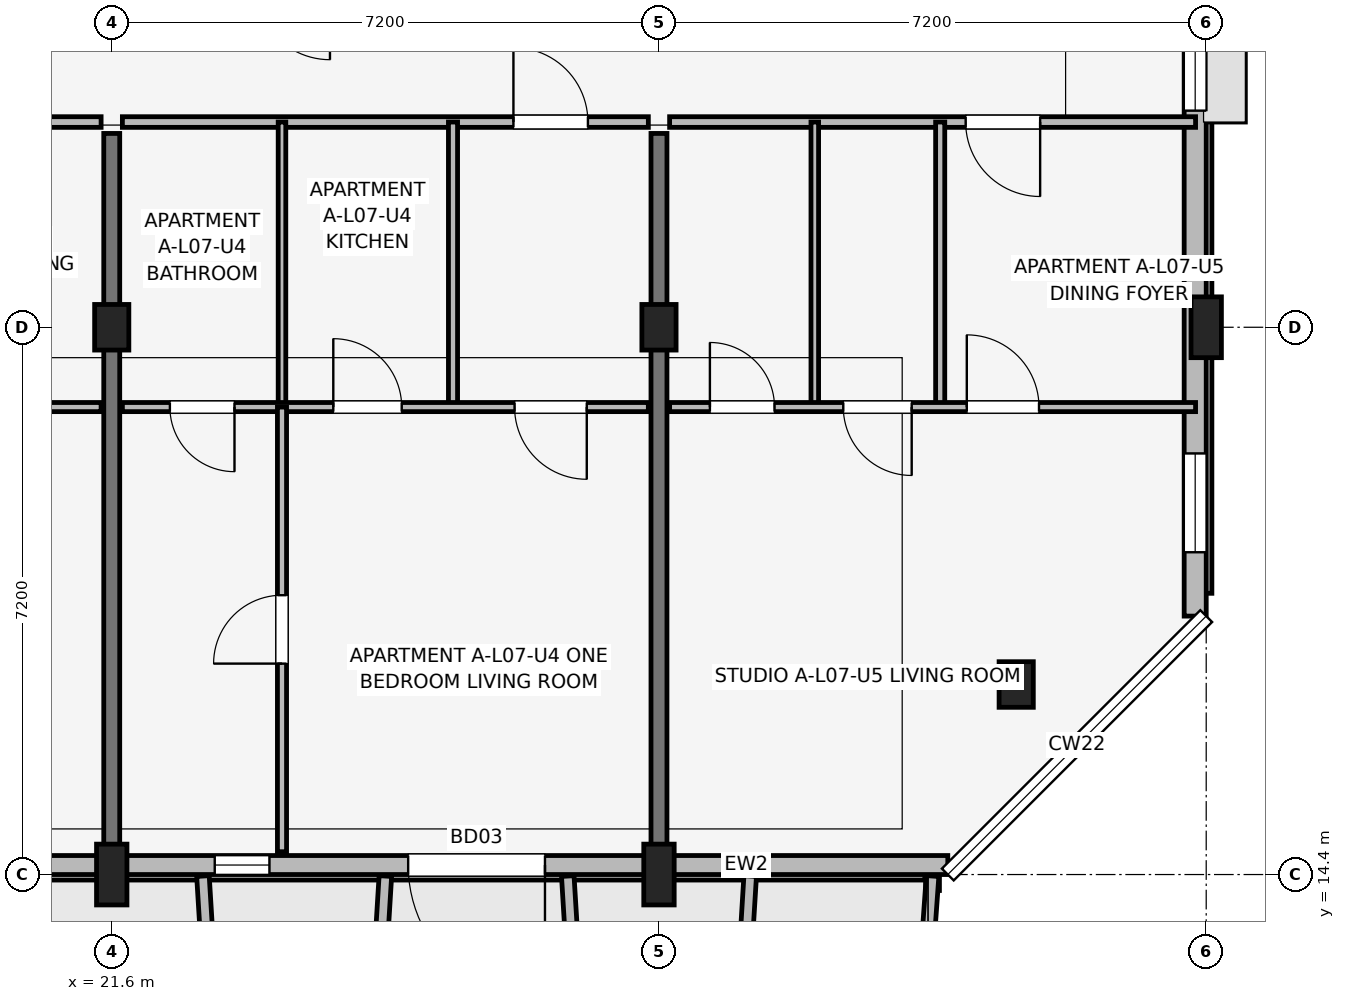
"""IFC4 building model, lengths in metres.
Left out: names, types, materials, properties, quantities, classifications, styles, units other than length and angle.
Written with IfcOpenShell. Run it as: python <this file> out.ifc"""

import sys

from ifc_helpers import new_model, si_unit, direction, frame, frame_2d, origin, origin_2d, place, context, subcontext, project, spatial, rectangle, extrude, element, fill, save


model = new_model("IFC4")
c1 = context("Model", 3, precision=1e-05, world=origin(), true_north=direction((0.0, 1.0)))
c2 = subcontext(c1, "Body", "Model", "MODEL_VIEW")
j1 = project(units=[si_unit("LENGTHUNIT", "METRE"), si_unit("PLANEANGLEUNIT", "RADIAN")], contexts=[c1])
p1 = place(None, origin())
s1 = spatial("IfcSite", under=j1, at=p1, CompositionType="ELEMENT")
p2 = place(p1, origin())
s2 = spatial("IfcBuilding", under=s1, at=p2, CompositionType="ELEMENT")
p3 = place(p2, frame((0.0, 0.0, 24.45)))
s3 = spatial("IfcBuildingStorey", under=s2, at=p3, CompositionType="ELEMENT", Elevation=24.45)
p4 = place(p3, frame((21.6, 14.4, 0.0), z_axis=(0.0, 0.0, 1.0), x_axis=(1.0, 0.0, 0.0)))
e1 = element("IfcColumn", 1, at=p4, inside=s3, PredefinedType="COLUMN", context=c2, shape_type="SweptSolid", body=[
    extrude(rectangle(XDim=0.4, YDim=0.8, at=origin_2d()), origin(), (0.0, 0.0, 1.0), 3.15),
])
p5 = place(p3, frame((21.6, 21.6, 0.0), z_axis=(0.0, 0.0, 1.0), x_axis=(1.0, 0.0, 0.0)))
e2 = element("IfcColumn", 2, at=p5, inside=s3, PredefinedType="COLUMN", context=c2, shape_type="SweptSolid", body=[
    extrude(rectangle(XDim=0.45, YDim=0.6, at=origin_2d()), origin(), (0.0, 0.0, 1.0), 3.15),
])
p6 = place(p3, frame((28.8, 14.4, 0.0), z_axis=(0.0, 0.0, 1.0), x_axis=(1.0, 0.0, 0.0)))
e3 = element("IfcColumn", 3, at=p6, inside=s3, PredefinedType="COLUMN", context=c2, shape_type="SweptSolid", body=[
    extrude(rectangle(XDim=0.4, YDim=0.8, at=origin_2d()), origin(), (0.0, 0.0, 1.0), 3.15),
])
for number, where, z_axis, x_axis in (
    (4, (28.8, 21.6, 0.0), (0.0, 0.0, 1.0), (1.0, 0.0, 0.0)),
    (5, (33.5, 16.9, 0.0), (0.0, 0.0, 1.0), (1.0, 0.0, 0.0)),
):
    element("IfcColumn", number, at=place(p3, frame(where, z_axis=z_axis, x_axis=x_axis)), inside=s3, PredefinedType="COLUMN", context=c2, shape_type="SweptSolid", body=[
        extrude(rectangle(XDim=0.45, YDim=0.6, at=origin_2d()), origin(), (0.0, 0.0, 1.0), 3.15),
    ])
p7 = place(p3, frame((36.0, 21.6, 0.0), z_axis=(0.0, 0.0, 1.0), x_axis=(1.0, 0.0, 0.0)))
e6 = element("IfcColumn", 6, at=p7, inside=s3, PredefinedType="COLUMN", context=c2, shape_type="SweptSolid", body=[
    extrude(rectangle(XDim=0.4, YDim=0.8, at=origin_2d()), origin(), (0.0, 0.0, 1.0), 3.15),
])
for number, where, z_axis, x_axis in (
    (7, (21.6, 14.75, 0.0), (0.0, 0.0, 1.0), (0.0, 1.0, 0.0)),
    (8, (28.8, 14.75, 0.0), (0.0, 0.0, 1.0), (0.0, 1.0, 0.0)),
):
    element("IfcWall", number, at=place(p3, frame(where, z_axis=z_axis, x_axis=x_axis)), inside=s3, PredefinedType="SHEAR", context=c2, shape_type="SweptSolid", body=[
        extrude(rectangle(XDim=9.4, YDim=0.21, at=frame_2d((4.7, 0.0))), origin(), (0.0, 0.0, 1.0), 3.15),
    ])
p8 = place(p3, frame((3.4, 14.525, 0.0), z_axis=(0.0, 0.0, 1.0), x_axis=(1.0, 0.0, 0.0)))
e9 = element("IfcWall", 9, at=p8, inside=s3, PredefinedType="SOLIDWALL", context=c2, shape_type="SweptSolid", body=[
    extrude(rectangle(XDim=29.2, YDim=0.25, at=frame_2d((14.6, 0.0))), origin(), (0.0, 0.0, 1.0), 2.43),
])
p9 = place(p8, frame((9.35, 0.0, 0.0), z_axis=(0.0, 0.0, 1.0), x_axis=(-1.0, 0.0, 0.0)))
e10 = element("IfcOpeningElement", 10, at=p9, cuts=e9, PredefinedType="OPENING", context=c2, shape_type="SweptSolid", body=[
    extrude(rectangle(XDim=1.5, YDim=2.15, at=frame_2d((0.75, 1.075))), frame((0.0, 0.135, 0.0), z_axis=(0.0, -1.0, 0.0), x_axis=(1.0, 0.0, 0.0)), (0.0, 0.0, 1.0), 0.27),
])
p10 = place(p8, frame((23.9, 0.0, 0.0), z_axis=(0.0, 0.0, 1.0), x_axis=(-1.0, 0.0, 0.0)))
e11 = element("IfcOpeningElement", 11, at=p10, cuts=e9, PredefinedType="OPENING", context=c2, shape_type="SweptSolid", body=[
    extrude(rectangle(XDim=1.8, YDim=2.15, at=frame_2d((0.9, 1.075))), frame((0.0, 0.135, 0.0), z_axis=(0.0, -1.0, 0.0), x_axis=(1.0, 0.0, 0.0)), (0.0, 0.0, 1.0), 0.27),
])
p11 = place(p8, frame((1.125, 0.0, 0.75)))
e12 = element("IfcOpeningElement", 12, at=p11, cuts=e9, PredefinedType="OPENING", context=c2, shape_type="SweptSolid", body=[
    extrude(rectangle(XDim=0.72, YDim=1.35, at=frame_2d((0.36, 0.675))), frame((0.0, 0.135, 0.0), z_axis=(0.0, -1.0, 0.0), x_axis=(1.0, 0.0, 0.0)), (0.0, 0.0, 1.0), 0.27),
])
p12 = place(p8, frame((5.155, 0.0, 0.75)))
e13 = element("IfcOpeningElement", 13, at=p12, cuts=e9, PredefinedType="OPENING", context=c2, shape_type="SweptSolid", body=[
    extrude(rectangle(XDim=0.72, YDim=1.35, at=frame_2d((0.36, 0.675))), frame((0.0, 0.135, 0.0), z_axis=(0.0, -1.0, 0.0), x_axis=(1.0, 0.0, 0.0)), (0.0, 0.0, 1.0), 0.27),
])
p13 = place(p8, frame((12.325, 0.0, 0.67)))
e14 = element("IfcOpeningElement", 14, at=p13, cuts=e9, PredefinedType="OPENING", context=c2, shape_type="SweptSolid", body=[
    extrude(rectangle(XDim=2.15, YDim=1.65, at=frame_2d((1.075, 0.825))), frame((0.0, 0.135, 0.0), z_axis=(0.0, -1.0, 0.0), x_axis=(1.0, 0.0, 0.0)), (0.0, 0.0, 1.0), 0.27),
])
p14 = place(p8, frame((19.555, 0.0, 0.75)))
e15 = element("IfcOpeningElement", 15, at=p14, cuts=e9, PredefinedType="OPENING", context=c2, shape_type="SweptSolid", body=[
    extrude(rectangle(XDim=0.72, YDim=1.35, at=frame_2d((0.36, 0.675))), frame((0.0, 0.135, 0.0), z_axis=(0.0, -1.0, 0.0), x_axis=(1.0, 0.0, 0.0)), (0.0, 0.0, 1.0), 0.27),
])
p15 = place(p3, frame((35.855, 17.8, 0.0), z_axis=(0.0, 0.0, 1.0), x_axis=(0.0, 1.0, 0.0)))
e16 = element("IfcWall", 16, at=p15, inside=s3, PredefinedType="SOLIDWALL", context=c2, shape_type="SweptSolid", body=[
    extrude(rectangle(XDim=14.8, YDim=0.29, at=frame_2d((7.4, 0.0))), origin(), (0.0, 0.0, 1.0), 2.43),
])
p16 = place(p15, frame((6.65, 0.0, 1.05)))
e17 = element("IfcOpeningElement", 17, at=p16, cuts=e16, PredefinedType="OPENING", context=c2, shape_type="SweptSolid", body=[
    extrude(rectangle(XDim=1.5, YDim=1.15, at=frame_2d((0.75, 0.575))), frame((0.0, 0.155, 0.0), z_axis=(0.0, -1.0, 0.0), x_axis=(1.0, 0.0, 0.0)), (0.0, 0.0, 1.0), 0.31),
])
p17 = place(p15, frame((0.84, 0.0, 0.75)))
e18 = element("IfcOpeningElement", 18, at=p17, cuts=e16, PredefinedType="OPENING", context=c2, shape_type="SweptSolid", body=[
    extrude(rectangle(XDim=1.3, YDim=1.55, at=frame_2d((0.65, 0.775))), frame((0.0, 0.155, 0.0), z_axis=(0.0, -1.0, 0.0), x_axis=(1.0, 0.0, 0.0)), (0.0, 0.0, 1.0), 0.31),
])
for number, where, z_axis, x_axis in (
    (19, (22.8, 14.38, 0.0), (0.0, 0.0, 1.0), (0.061, -0.998, 0.0)),
    (20, (25.2, 14.38, 0.0), (0.0, 0.0, 1.0), (-0.061, -0.998, 0.0)),
    (21, (27.6, 14.38, 0.0), (0.0, 0.0, 1.0), (0.061, -0.998, 0.0)),
):
    element("IfcWall", number, at=place(p3, frame(where, z_axis=z_axis, x_axis=x_axis)), inside=s3, PredefinedType="ELEMENTEDWALL", context=c2, shape_type="SweptSolid", body=[
        extrude(rectangle(XDim=1.964, YDim=0.165, at=frame_2d((0.982, 0.0))), origin(), (0.0, 0.0, 1.0), 2.58),
    ])
p18 = place(p3, frame((30.0, 14.38, 0.0), z_axis=(0.0, 0.0, 1.0), x_axis=(-0.061170732449, -0.998127317276, 0.0)))
e22 = element("IfcWall", 22, at=p18, inside=s3, PredefinedType="ELEMENTEDWALL", context=c2, shape_type="SweptSolid", body=[
    extrude(rectangle(XDim=1.964, YDim=0.165, at=frame_2d((0.982, 0.0))), origin(), (0.0, 0.0, 1.0), 2.8),
])
p19 = place(p3, frame((32.4, 14.38, 0.0), z_axis=(0.0, 0.0, 1.0), x_axis=(-0.071194071069, -0.997462482625, 0.0)))
e23 = element("IfcWall", 23, at=p19, inside=s3, PredefinedType="ELEMENTEDWALL", context=c2, shape_type="SweptSolid", body=[
    extrude(rectangle(XDim=1.965, YDim=0.165, at=frame_2d((0.982, 0.0))), origin(), (0.0, 0.0, 1.0), 2.8),
])
p20 = place(p3, frame((14.54, 24.3, 0.0), z_axis=(0.0, 0.0, 1.0), x_axis=(1.0, 0.0, 0.0)))
e24 = element("IfcWall", 24, at=p20, inside=s3, PredefinedType="PARTITIONING", context=c2, shape_type="SweptSolid", body=[
    extrude(rectangle(XDim=6.92, YDim=0.14, at=frame_2d((3.46, 0.0))), origin(), (0.0, 0.0, 1.0), 2.38),
])
p21 = place(p20, frame((4.995, 0.0, 0.0)))
e25 = element("IfcOpeningElement", 25, at=p21, cuts=e24, PredefinedType="OPENING", context=c2, shape_type="SweptSolid", body=[
    extrude(rectangle(XDim=0.98, YDim=2.1, at=frame_2d((0.49, 1.05))), frame((0.0, 0.08, 0.0), z_axis=(0.0, -1.0, 0.0), x_axis=(1.0, 0.0, 0.0)), (0.0, 0.0, 1.0), 0.16),
])
p22 = place(p3, frame((14.54, 20.55, 0.0), z_axis=(0.0, 0.0, 1.0), x_axis=(1.0, 0.0, 0.0)))
e26 = element("IfcWall", 26, at=p22, inside=s3, PredefinedType="PARTITIONING", context=c2, shape_type="SweptSolid", body=[
    extrude(rectangle(XDim=6.92, YDim=0.12, at=frame_2d((3.46, 0.0))), origin(), (0.0, 0.0, 1.0), 2.38),
])
p23 = place(p22, frame((1.475, 0.0, 0.0), z_axis=(0.0, 0.0, 1.0), x_axis=(-1.0, 0.0, 0.0)))
e27 = element("IfcOpeningElement", 27, at=p23, cuts=e26, PredefinedType="OPENING", context=c2, shape_type="SweptSolid", body=[
    extrude(rectangle(XDim=0.85, YDim=2.08, at=frame_2d((0.425, 1.04))), frame((0.0, 0.07, 0.0), z_axis=(0.0, -1.0, 0.0), x_axis=(1.0, 0.0, 0.0)), (0.0, 0.0, 1.0), 0.14),
])
p24 = place(p22, frame((2.625, 0.0, 0.0)))
e28 = element("IfcOpeningElement", 28, at=p24, cuts=e26, PredefinedType="OPENING", context=c2, shape_type="SweptSolid", body=[
    extrude(rectangle(XDim=0.9, YDim=2.08, at=frame_2d((0.45, 1.04))), frame((0.0, 0.07, 0.0), z_axis=(0.0, -1.0, 0.0), x_axis=(1.0, 0.0, 0.0)), (0.0, 0.0, 1.0), 0.14),
])
p25 = place(p22, frame((5.96, 0.0, 0.0), z_axis=(0.0, 0.0, 1.0), x_axis=(-1.0, 0.0, 0.0)))
e29 = element("IfcOpeningElement", 29, at=p25, cuts=e26, PredefinedType="OPENING", context=c2, shape_type="SweptSolid", body=[
    extrude(rectangle(XDim=0.95, YDim=2.08, at=frame_2d((0.475, 1.04))), frame((0.0, 0.07, 0.0), z_axis=(0.0, -1.0, 0.0), x_axis=(1.0, 0.0, 0.0)), (0.0, 0.0, 1.0), 0.14),
])
p26 = place(p3, frame((21.74, 24.3, 0.0), z_axis=(0.0, 0.0, 1.0), x_axis=(1.0, 0.0, 0.0)))
e30 = element("IfcWall", 30, at=p26, inside=s3, PredefinedType="PARTITIONING", context=c2, shape_type="SweptSolid", body=[
    extrude(rectangle(XDim=6.92, YDim=0.14, at=frame_2d((3.46, 0.0))), origin(), (0.0, 0.0, 1.0), 2.38),
])
p27 = place(p26, frame((5.145, 0.0, 0.0)))
e31 = element("IfcOpeningElement", 31, at=p27, cuts=e30, PredefinedType="OPENING", context=c2, shape_type="SweptSolid", body=[
    extrude(rectangle(XDim=0.98, YDim=2.1, at=frame_2d((0.49, 1.05))), frame((0.0, 0.08, 0.0), z_axis=(0.0, -1.0, 0.0), x_axis=(1.0, 0.0, 0.0)), (0.0, 0.0, 1.0), 0.16),
])
p28 = place(p3, frame((23.84, 20.55, 0.0), z_axis=(0.0, 0.0, 1.0), x_axis=(0.0, 1.0, 0.0)))
e32 = element("IfcWall", 32, at=p28, inside=s3, PredefinedType="PARTITIONING", context=c2, shape_type="SweptSolid", body=[
    extrude(rectangle(XDim=3.75, YDim=0.1, at=frame_2d((1.875, 0.0))), origin(), (0.0, 0.0, 1.0), 2.38),
])
p29 = place(p3, frame((26.09, 20.55, 0.0), z_axis=(0.0, 0.0, 1.0), x_axis=(0.0, 1.0, 0.0)))
e33 = element("IfcWall", 33, at=p29, inside=s3, PredefinedType="PARTITIONING", context=c2, shape_type="SweptSolid", body=[
    extrude(rectangle(XDim=3.75, YDim=0.12, at=frame_2d((1.875, 0.0))), origin(), (0.0, 0.0, 1.0), 2.38),
])
p30 = place(p3, frame((21.74, 20.55, 0.0), z_axis=(0.0, 0.0, 1.0), x_axis=(1.0, 0.0, 0.0)))
e34 = element("IfcWall", 34, at=p30, inside=s3, PredefinedType="PARTITIONING", context=c2, shape_type="SweptSolid", body=[
    extrude(rectangle(XDim=6.92, YDim=0.12, at=frame_2d((3.46, 0.0))), origin(), (0.0, 0.0, 1.0), 2.38),
])
p31 = place(p30, frame((1.475, 0.0, 0.0), z_axis=(0.0, 0.0, 1.0), x_axis=(-1.0, 0.0, 0.0)))
e35 = element("IfcOpeningElement", 35, at=p31, cuts=e34, PredefinedType="OPENING", context=c2, shape_type="SweptSolid", body=[
    extrude(rectangle(XDim=0.85, YDim=2.08, at=frame_2d((0.425, 1.04))), frame((0.0, 0.07, 0.0), z_axis=(0.0, -1.0, 0.0), x_axis=(1.0, 0.0, 0.0)), (0.0, 0.0, 1.0), 0.14),
])
p32 = place(p30, frame((2.775, 0.0, 0.0)))
e36 = element("IfcOpeningElement", 36, at=p32, cuts=e34, PredefinedType="OPENING", context=c2, shape_type="SweptSolid", body=[
    extrude(rectangle(XDim=0.9, YDim=2.08, at=frame_2d((0.45, 1.04))), frame((0.0, 0.07, 0.0), z_axis=(0.0, -1.0, 0.0), x_axis=(1.0, 0.0, 0.0)), (0.0, 0.0, 1.0), 0.14),
])
p33 = place(p30, frame((6.11, 0.0, 0.0), z_axis=(0.0, 0.0, 1.0), x_axis=(-1.0, 0.0, 0.0)))
e37 = element("IfcOpeningElement", 37, at=p33, cuts=e34, PredefinedType="OPENING", context=c2, shape_type="SweptSolid", body=[
    extrude(rectangle(XDim=0.95, YDim=2.08, at=frame_2d((0.475, 1.04))), frame((0.0, 0.07, 0.0), z_axis=(0.0, -1.0, 0.0), x_axis=(1.0, 0.0, 0.0)), (0.0, 0.0, 1.0), 0.14),
])
p34 = place(p3, frame((23.84, 14.7, 0.0), z_axis=(0.0, 0.0, 1.0), x_axis=(0.0, 1.0, 0.0)))
e38 = element("IfcWall", 38, at=p34, inside=s3, PredefinedType="PARTITIONING", context=c2, shape_type="SweptSolid", body=[
    extrude(rectangle(XDim=5.85, YDim=0.12, at=frame_2d((2.925, 0.0))), origin(), (0.0, 0.0, 1.0), 2.38),
])
p35 = place(p34, frame((2.475, 0.0, 0.0)))
e39 = element("IfcOpeningElement", 39, at=p35, cuts=e38, PredefinedType="OPENING", context=c2, shape_type="SweptSolid", body=[
    extrude(rectangle(XDim=0.9, YDim=2.08, at=frame_2d((0.45, 1.04))), frame((0.0, 0.07, 0.0), z_axis=(0.0, -1.0, 0.0), x_axis=(1.0, 0.0, 0.0)), (0.0, 0.0, 1.0), 0.14),
])
p36 = place(p3, frame((28.94, 24.3, 0.0), z_axis=(0.0, 0.0, 1.0), x_axis=(1.0, 0.0, 0.0)))
e40 = element("IfcWall", 40, at=p36, inside=s3, PredefinedType="PARTITIONING", context=c2, shape_type="SweptSolid", body=[
    extrude(rectangle(XDim=6.92, YDim=0.14, at=frame_2d((3.46, 0.0))), origin(), (0.0, 0.0, 1.0), 2.38),
])
p37 = place(p36, frame((4.875, 0.0, 0.0), z_axis=(0.0, 0.0, 1.0), x_axis=(-1.0, 0.0, 0.0)))
e41 = element("IfcOpeningElement", 41, at=p37, cuts=e40, PredefinedType="OPENING", context=c2, shape_type="SweptSolid", body=[
    extrude(rectangle(XDim=0.98, YDim=2.1, at=frame_2d((0.49, 1.05))), frame((0.0, 0.08, 0.0), z_axis=(0.0, -1.0, 0.0), x_axis=(1.0, 0.0, 0.0)), (0.0, 0.0, 1.0), 0.16),
])
p38 = place(p3, frame((30.85, 20.55, 0.0), z_axis=(0.0, 0.0, 1.0), x_axis=(0.0, 1.0, 0.0)))
e42 = element("IfcWall", 42, at=p38, inside=s3, PredefinedType="PARTITIONING", context=c2, shape_type="SweptSolid", body=[
    extrude(rectangle(XDim=3.75, YDim=0.1, at=frame_2d((1.875, 0.0))), origin(), (0.0, 0.0, 1.0), 2.38),
])
p39 = place(p3, frame((32.5, 20.55, 0.0), z_axis=(0.0, 0.0, 1.0), x_axis=(0.0, 1.0, 0.0)))
e43 = element("IfcWall", 43, at=p39, inside=s3, PredefinedType="PARTITIONING", context=c2, shape_type="SweptSolid", body=[
    extrude(rectangle(XDim=3.75, YDim=0.12, at=frame_2d((1.875, 0.0))), origin(), (0.0, 0.0, 1.0), 2.38),
])
p40 = place(p3, frame((28.94, 20.55, 0.0), z_axis=(0.0, 0.0, 1.0), x_axis=(1.0, 0.0, 0.0)))
e44 = element("IfcWall", 44, at=p40, inside=s3, PredefinedType="PARTITIONING", context=c2, shape_type="SweptSolid", body=[
    extrude(rectangle(XDim=6.92, YDim=0.12, at=frame_2d((3.46, 0.0))), origin(), (0.0, 0.0, 1.0), 2.38),
])
p41 = place(p40, frame((0.53, 0.0, 0.0)))
e45 = element("IfcOpeningElement", 45, at=p41, cuts=e44, PredefinedType="OPENING", context=c2, shape_type="SweptSolid", body=[
    extrude(rectangle(XDim=0.85, YDim=2.08, at=frame_2d((0.425, 1.04))), frame((0.0, 0.07, 0.0), z_axis=(0.0, -1.0, 0.0), x_axis=(1.0, 0.0, 0.0)), (0.0, 0.0, 1.0), 0.14),
])
p42 = place(p40, frame((3.185, 0.0, 0.0), z_axis=(0.0, 0.0, 1.0), x_axis=(-1.0, 0.0, 0.0)))
e46 = element("IfcOpeningElement", 46, at=p42, cuts=e44, PredefinedType="OPENING", context=c2, shape_type="SweptSolid", body=[
    extrude(rectangle(XDim=0.9, YDim=2.08, at=frame_2d((0.45, 1.04))), frame((0.0, 0.07, 0.0), z_axis=(0.0, -1.0, 0.0), x_axis=(1.0, 0.0, 0.0)), (0.0, 0.0, 1.0), 0.14),
])
p43 = place(p40, frame((3.91, 0.0, 0.0)))
e47 = element("IfcOpeningElement", 47, at=p43, cuts=e44, PredefinedType="OPENING", context=c2, shape_type="SweptSolid", body=[
    extrude(rectangle(XDim=0.95, YDim=2.08, at=frame_2d((0.475, 1.04))), frame((0.0, 0.07, 0.0), z_axis=(0.0, -1.0, 0.0), x_axis=(1.0, 0.0, 0.0)), (0.0, 0.0, 1.0), 0.14),
])
p44 = place(p10, origin())
e48 = element("IfcDoor", 48, at=p44, inside=s3, OperationType="SINGLE_SWING_RIGHT", PredefinedType="DOOR", context=c2, shape_type="SweptSolid", body=[
    extrude(rectangle(XDim=1.8, YDim=2.15, at=frame_2d((0.9, 1.075))), frame((0.0, 0.025, 0.0), z_axis=(0.0, -1.0, 0.0), x_axis=(1.0, 0.0, 0.0)), (0.0, 0.0, 1.0), 0.05),
])
fill(e11, e48)
p45 = place(p14, origin())
e49 = element("IfcWindow", 49, at=p45, inside=s3, PartitioningType="SINGLE_PANEL", PredefinedType="WINDOW", context=c2, shape_type="SweptSolid", body=[
    extrude(rectangle(XDim=0.72, YDim=1.35, at=frame_2d((0.36, 0.675))), frame((0.0, 0.03, 0.0), z_axis=(0.0, -1.0, 0.0), x_axis=(1.0, 0.0, 0.0)), (0.0, 0.0, 1.0), 0.06),
])
fill(e15, e49)
p46 = place(p16, origin())
e50 = element("IfcWindow", 50, at=p46, inside=s3, PartitioningType="SINGLE_PANEL", PredefinedType="WINDOW", context=c2, shape_type="SweptSolid", body=[
    extrude(rectangle(XDim=1.5, YDim=1.15, at=frame_2d((0.75, 0.575))), frame((0.0, 0.03, 0.0), z_axis=(0.0, -1.0, 0.0), x_axis=(1.0, 0.0, 0.0)), (0.0, 0.0, 1.0), 0.06),
])
fill(e17, e50)
p47 = place(p17, origin())
e51 = element("IfcWindow", 51, at=p47, inside=s3, PartitioningType="SINGLE_PANEL", PredefinedType="WINDOW", context=c2, shape_type="SweptSolid", body=[
    extrude(rectangle(XDim=1.3, YDim=1.55, at=frame_2d((0.65, 0.775))), frame((0.0, 0.03, 0.0), z_axis=(0.0, -1.0, 0.0), x_axis=(1.0, 0.0, 0.0)), (0.0, 0.0, 1.0), 0.06),
])
fill(e18, e51)
p48 = place(p27, origin())
e52 = element("IfcDoor", 52, at=p48, inside=s3, OperationType="SINGLE_SWING_LEFT", PredefinedType="DOOR", context=c2, shape_type="SweptSolid", body=[
    extrude(rectangle(XDim=0.98, YDim=2.1, at=frame_2d((0.49, 1.05))), frame((0.0, 0.025, 0.0), z_axis=(0.0, -1.0, 0.0), x_axis=(1.0, 0.0, 0.0)), (0.0, 0.0, 1.0), 0.05),
])
fill(e31, e52)
p49 = place(p31, origin())
e53 = element("IfcDoor", 53, at=p49, inside=s3, OperationType="SINGLE_SWING_RIGHT", PredefinedType="DOOR", context=c2, shape_type="SweptSolid", body=[
    extrude(rectangle(XDim=0.85, YDim=2.08, at=frame_2d((0.425, 1.04))), frame((0.0, 0.025, 0.0), z_axis=(0.0, -1.0, 0.0), x_axis=(1.0, 0.0, 0.0)), (0.0, 0.0, 1.0), 0.05),
])
fill(e35, e53)
p50 = place(p32, origin())
e54 = element("IfcDoor", 54, at=p50, inside=s3, OperationType="SINGLE_SWING_LEFT", PredefinedType="DOOR", context=c2, shape_type="SweptSolid", body=[
    extrude(rectangle(XDim=0.9, YDim=2.08, at=frame_2d((0.45, 1.04))), frame((0.0, 0.025, 0.0), z_axis=(0.0, -1.0, 0.0), x_axis=(1.0, 0.0, 0.0)), (0.0, 0.0, 1.0), 0.05),
])
fill(e36, e54)
p51 = place(p33, origin())
e55 = element("IfcDoor", 55, at=p51, inside=s3, OperationType="SINGLE_SWING_RIGHT", PredefinedType="DOOR", context=c2, shape_type="SweptSolid", body=[
    extrude(rectangle(XDim=0.95, YDim=2.08, at=frame_2d((0.475, 1.04))), frame((0.0, 0.025, 0.0), z_axis=(0.0, -1.0, 0.0), x_axis=(1.0, 0.0, 0.0)), (0.0, 0.0, 1.0), 0.05),
])
fill(e37, e55)
p52 = place(p35, origin())
e56 = element("IfcDoor", 56, at=p52, inside=s3, OperationType="SINGLE_SWING_LEFT", PredefinedType="DOOR", context=c2, shape_type="SweptSolid", body=[
    extrude(rectangle(XDim=0.9, YDim=2.08, at=frame_2d((0.45, 1.04))), frame((0.0, 0.025, 0.0), z_axis=(0.0, -1.0, 0.0), x_axis=(1.0, 0.0, 0.0)), (0.0, 0.0, 1.0), 0.05),
])
fill(e39, e56)
p53 = place(p37, origin())
e57 = element("IfcDoor", 57, at=p53, inside=s3, OperationType="SINGLE_SWING_RIGHT", PredefinedType="DOOR", context=c2, shape_type="SweptSolid", body=[
    extrude(rectangle(XDim=0.98, YDim=2.1, at=frame_2d((0.49, 1.05))), frame((0.0, 0.025, 0.0), z_axis=(0.0, -1.0, 0.0), x_axis=(1.0, 0.0, 0.0)), (0.0, 0.0, 1.0), 0.05),
])
fill(e41, e57)
p54 = place(p41, origin())
e58 = element("IfcDoor", 58, at=p54, inside=s3, OperationType="SINGLE_SWING_LEFT", PredefinedType="DOOR", context=c2, shape_type="SweptSolid", body=[
    extrude(rectangle(XDim=0.85, YDim=2.08, at=frame_2d((0.425, 1.04))), frame((0.0, 0.025, 0.0), z_axis=(0.0, -1.0, 0.0), x_axis=(1.0, 0.0, 0.0)), (0.0, 0.0, 1.0), 0.05),
])
fill(e45, e58)
p55 = place(p42, origin())
e59 = element("IfcDoor", 59, at=p55, inside=s3, OperationType="SINGLE_SWING_RIGHT", PredefinedType="DOOR", context=c2, shape_type="SweptSolid", body=[
    extrude(rectangle(XDim=0.9, YDim=2.08, at=frame_2d((0.45, 1.04))), frame((0.0, 0.025, 0.0), z_axis=(0.0, -1.0, 0.0), x_axis=(1.0, 0.0, 0.0)), (0.0, 0.0, 1.0), 0.05),
])
fill(e46, e59)
p56 = place(p43, origin())
e60 = element("IfcDoor", 60, at=p56, inside=s3, OperationType="SINGLE_SWING_LEFT", PredefinedType="DOOR", context=c2, shape_type="SweptSolid", body=[
    extrude(rectangle(XDim=0.95, YDim=2.08, at=frame_2d((0.475, 1.04))), frame((0.0, 0.025, 0.0), z_axis=(0.0, -1.0, 0.0), x_axis=(1.0, 0.0, 0.0)), (0.0, 0.0, 1.0), 0.05),
])
fill(e47, e60)
save(model, sys.argv[1])
